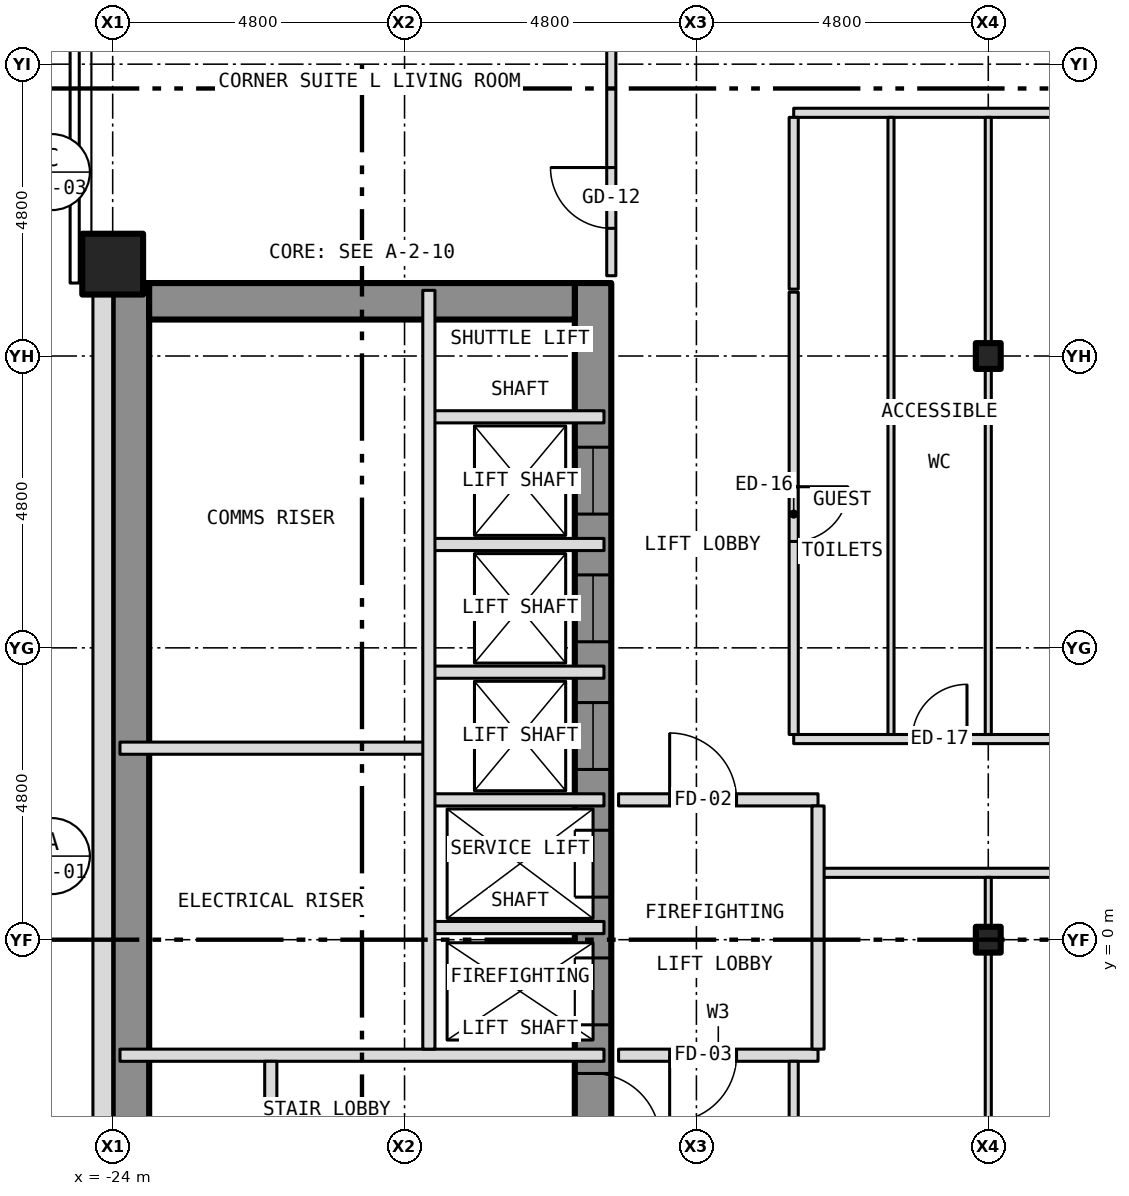
"""IFC4 building model, lengths in metres.
Left out: names, types, materials, properties, quantities, classifications, styles, units other than length and angle.
Written with IfcOpenShell. Run it as: python <this file> out.ifc"""

import sys

from ifc_helpers import new_model, si_unit, direction, frame, frame_2d, origin, origin_2d, place, context, subcontext, project, spatial, rectangle, hollow_rectangle, i_section, extrude, element, fill, save


model = new_model("IFC4")
c1 = context("Model", 3, precision=1e-05, world=origin(), true_north=direction((0.0, 1.0)))
c2 = subcontext(c1, "Body", "Model", "MODEL_VIEW")
j1 = project(units=[si_unit("LENGTHUNIT", "METRE"), si_unit("PLANEANGLEUNIT", "RADIAN")], contexts=[c1])
p1 = place(None, origin())
s1 = spatial("IfcSite", under=j1, at=p1, CompositionType="ELEMENT")
p2 = place(p1, origin())
s2 = spatial("IfcBuilding", under=s1, at=p2, CompositionType="ELEMENT")
p3 = place(p2, frame((0.0, 0.0, 39.0)))
s3 = spatial("IfcBuildingStorey", under=s2, at=p3, CompositionType="ELEMENT", Elevation=39.0)
p4 = place(p3, frame((-24.0, 11.111, -0.15), z_axis=(0.0, 0.0, 1.0), x_axis=(1.0, 0.0, 0.0)))
e1 = element("IfcColumn", 1, at=p4, inside=s3, PredefinedType="COLUMN", context=c2, shape_type="SweptSolid", body=[
    extrude(hollow_rectangle(XDim=1.0, YDim=1.0, WallThickness=0.06, at=origin_2d()), origin(), (0.0, 0.0, 1.0), 3.5),
])
for number, where, z_axis, x_axis in (
    (2, (-9.6, 0.0, -0.15), (0.0, 0.0, 1.0), (1.0, 0.0, 0.0)),
    (3, (-9.6, 9.6, -0.15), (0.0, 0.0, 1.0), (1.0, 0.0, 0.0)),
):
    element("IfcColumn", number, at=place(p3, frame(where, z_axis=z_axis, x_axis=x_axis)), inside=s3, PredefinedType="COLUMN", context=c2, shape_type="SweptSolid", body=[
        extrude(i_section(OverallWidth=0.409, OverallDepth=0.424, WebThickness=0.033, FlangeThickness=0.052, at=origin_2d()), origin(), (0.0, 0.0, 1.0), 3.5),
    ])
p5 = place(p3, frame((-16.1, -10.8, 0.0), z_axis=(0.0, 0.0, 1.0), x_axis=(0.0, 1.0, 0.0)))
e4 = element("IfcWall", 4, at=p5, inside=s3, PredefinedType="SHEAR", context=c2, shape_type="SweptSolid", body=[
    extrude(rectangle(XDim=21.6, YDim=0.6, at=frame_2d((10.8, 0.0))), origin(), (0.0, 0.0, 1.0), 3.25),
])
p6 = place(p5, frame((9.4, 0.0, 0.0)))
e5 = element("IfcOpeningElement", 5, at=p6, cuts=e4, PredefinedType="OPENING", context=c2, shape_type="SweptSolid", body=[
    extrude(rectangle(XDim=1.1, YDim=2.1, at=frame_2d((0.55, 1.05))), frame((0.0, 0.312, 0.0), z_axis=(0.0, -1.0, 0.0), x_axis=(1.0, 0.0, 0.0)), (0.0, 0.0, 1.0), 0.624),
])
p7 = place(p5, frame((11.5, 0.0, 0.0)))
e6 = element("IfcOpeningElement", 6, at=p7, cuts=e4, PredefinedType="OPENING", context=c2, shape_type="SweptSolid", body=[
    extrude(rectangle(XDim=1.1, YDim=2.1, at=frame_2d((0.55, 1.05))), frame((0.0, 0.312, 0.0), z_axis=(0.0, -1.0, 0.0), x_axis=(1.0, 0.0, 0.0)), (0.0, 0.0, 1.0), 0.624),
])
p8 = place(p5, frame((13.6, 0.0, 0.0)))
e7 = element("IfcOpeningElement", 7, at=p8, cuts=e4, PredefinedType="OPENING", context=c2, shape_type="SweptSolid", body=[
    extrude(rectangle(XDim=1.1, YDim=2.1, at=frame_2d((0.55, 1.05))), frame((0.0, 0.312, 0.0), z_axis=(0.0, -1.0, 0.0), x_axis=(1.0, 0.0, 0.0)), (0.0, 0.0, 1.0), 0.624),
])
p9 = place(p5, frame((15.7, 0.0, 0.0)))
e8 = element("IfcOpeningElement", 8, at=p9, cuts=e4, PredefinedType="OPENING", context=c2, shape_type="SweptSolid", body=[
    extrude(rectangle(XDim=1.1, YDim=2.1, at=frame_2d((0.55, 1.05))), frame((0.0, 0.312, 0.0), z_axis=(0.0, -1.0, 0.0), x_axis=(1.0, 0.0, 0.0)), (0.0, 0.0, 1.0), 0.624),
])
p10 = place(p5, frame((17.8, 0.0, 0.0)))
e9 = element("IfcOpeningElement", 9, at=p10, cuts=e4, PredefinedType="OPENING", context=c2, shape_type="SweptSolid", body=[
    extrude(rectangle(XDim=1.1, YDim=2.1, at=frame_2d((0.55, 1.05))), frame((0.0, 0.312, 0.0), z_axis=(0.0, -1.0, 0.0), x_axis=(1.0, 0.0, 0.0)), (0.0, 0.0, 1.0), 0.624),
])
p11 = place(p5, frame((0.758, 0.0, 0.0)))
e10 = element("IfcOpeningElement", 10, at=p11, cuts=e4, PredefinedType="OPENING", context=c2, shape_type="SweptSolid", body=[
    extrude(rectangle(XDim=1.1, YDim=2.1, at=frame_2d((0.55, 1.05))), frame((0.0, 0.312, 0.0), z_axis=(0.0, -1.0, 0.0), x_axis=(1.0, 0.0, 0.0)), (0.0, 0.0, 1.0), 0.624),
])
p12 = place(p5, frame((7.5, 0.0, 0.0)))
e11 = element("IfcOpeningElement", 11, at=p12, cuts=e4, PredefinedType="OPENING", context=c2, shape_type="SweptSolid", body=[
    extrude(rectangle(XDim=1.1, YDim=2.1, at=frame_2d((0.55, 1.05))), frame((0.0, 0.312, 0.0), z_axis=(0.0, -1.0, 0.0), x_axis=(1.0, 0.0, 0.0)), (0.0, 0.0, 1.0), 0.624),
])
p13 = place(p3, frame((-23.7, -10.8, 0.0), z_axis=(0.0, 0.0, 1.0), x_axis=(0.0, 1.0, 0.0)))
e12 = element("IfcWall", 12, at=p13, inside=s3, PredefinedType="SHEAR", context=c2, shape_type="SweptSolid", body=[
    extrude(rectangle(XDim=21.6, YDim=0.6, at=frame_2d((10.8, 0.0))), origin(), (0.0, 0.0, 1.0), 3.25),
])
p14 = place(p3, frame((-23.4, 10.5, 0.0), z_axis=(0.0, 0.0, 1.0), x_axis=(1.0, 0.0, 0.0)))
e13 = element("IfcWall", 13, at=p14, inside=s3, PredefinedType="SHEAR", context=c2, shape_type="SweptSolid", body=[
    extrude(rectangle(XDim=7.0, YDim=0.6, at=frame_2d((3.5, 0.0))), origin(), (0.0, 0.0, 1.0), 3.25),
])
p15 = place(p3, frame((-24.163, 10.8, 0.0), z_axis=(0.0, 0.0, 1.0), x_axis=(0.0, -1.0, 0.0)))
e14 = element("IfcWall", 14, at=p15, inside=s3, PredefinedType="SOLIDWALL", context=c2, shape_type="SweptSolid", body=[
    extrude(rectangle(XDim=21.6, YDim=0.325, at=frame_2d((10.8, 0.0))), origin(), (0.0, 0.0, 1.0), 3.5),
])
p16 = place(p15, frame((18.05, 0.0, 1.0)))
e15 = element("IfcOpeningElement", 15, at=p16, cuts=e14, PredefinedType="OPENING", context=c2, shape_type="SweptSolid", body=[
    extrude(rectangle(XDim=0.6, YDim=1.5, at=frame_2d((0.3, 0.75))), frame((0.0, 0.175, 0.0), z_axis=(0.0, -1.0, 0.0), x_axis=(1.0, 0.0, 0.0)), (0.0, 0.0, 1.0), 0.349),
])
p17 = place(p3, frame((-23.88, -1.9, 0.0), z_axis=(0.0, 0.0, 1.0), x_axis=(1.0, 0.0, 0.0)))
e16 = element("IfcWall", 16, at=p17, inside=s3, PredefinedType="PARTITIONING", context=c2, shape_type="SweptSolid", body=[
    extrude(rectangle(XDim=7.96, YDim=0.2, at=frame_2d((3.98, 0.0))), origin(), (0.0, 0.0, 1.0), 3.25),
])
p18 = place(p3, frame((-15.68, -1.9, 0.0), z_axis=(0.0, 0.0, 1.0), x_axis=(1.0, 0.0, 0.0)))
e17 = element("IfcWall", 17, at=p18, inside=s3, PredefinedType="PARTITIONING", context=c2, shape_type="SweptSolid", body=[
    extrude(rectangle(XDim=3.28, YDim=0.2, at=frame_2d((1.64, 0.0))), origin(), (0.0, 0.0, 1.0), 3.35),
])
p19 = place(p18, frame((0.84, 0.0, 0.0)))
e18 = element("IfcOpeningElement", 18, at=p19, cuts=e17, PredefinedType="OPENING", context=c2, shape_type="SweptSolid", body=[
    extrude(rectangle(XDim=1.1, YDim=2.1, at=frame_2d((0.55, 1.05))), frame((0.0, 0.112, 0.0), z_axis=(0.0, -1.0, 0.0), x_axis=(1.0, 0.0, 0.0)), (0.0, 0.0, 1.0), 0.224),
])
p20 = place(p3, frame((-18.8, 0.2, 0.0), z_axis=(0.0, 0.0, 1.0), x_axis=(1.0, 0.0, 0.0)))
e19 = element("IfcWall", 19, at=p20, inside=s3, PredefinedType="PARTITIONING", context=c2, shape_type="SweptSolid", body=[
    extrude(rectangle(XDim=2.88, YDim=0.2, at=frame_2d((1.44, 0.0))), origin(), (0.0, 0.0, 1.0), 3.25),
])
p21 = place(p3, frame((-12.4, 1.1, 0.0), z_axis=(0.0, 0.0, 1.0), x_axis=(1.0, 0.0, 0.0)))
e20 = element("IfcWall", 20, at=p21, inside=s3, PredefinedType="PARTITIONING", context=c2, shape_type="SweptSolid", body=[
    extrude(rectangle(XDim=24.8, YDim=0.15, at=frame_2d((12.4, 0.0))), origin(), (0.0, 0.0, 1.0), 3.35),
])
p22 = place(p3, frame((-18.8, 2.3, 0.0), z_axis=(0.0, 0.0, 1.0), x_axis=(1.0, 0.0, 0.0)))
e21 = element("IfcWall", 21, at=p22, inside=s3, PredefinedType="PARTITIONING", context=c2, shape_type="SweptSolid", body=[
    extrude(rectangle(XDim=2.88, YDim=0.2, at=frame_2d((1.44, 0.0))), origin(), (0.0, 0.0, 1.0), 3.25),
])
p23 = place(p3, frame((-15.68, 2.3, 0.0), z_axis=(0.0, 0.0, 1.0), x_axis=(1.0, 0.0, 0.0)))
e22 = element("IfcWall", 22, at=p23, inside=s3, PredefinedType="PARTITIONING", context=c2, shape_type="SweptSolid", body=[
    extrude(rectangle(XDim=3.28, YDim=0.2, at=frame_2d((1.64, 0.0))), origin(), (0.0, 0.0, 1.0), 3.35),
])
p24 = place(p23, frame((0.84, 0.0, 0.0)))
e23 = element("IfcOpeningElement", 23, at=p24, cuts=e22, PredefinedType="OPENING", context=c2, shape_type="SweptSolid", body=[
    extrude(rectangle(XDim=1.1, YDim=2.1, at=frame_2d((0.55, 1.05))), frame((0.0, 0.112, 0.0), z_axis=(0.0, -1.0, 0.0), x_axis=(1.0, 0.0, 0.0)), (0.0, 0.0, 1.0), 0.224),
])
p25 = place(p3, frame((-23.88, 3.15, 0.0), z_axis=(0.0, 0.0, 1.0), x_axis=(1.0, 0.0, 0.0)))
e24 = element("IfcWall", 24, at=p25, inside=s3, PredefinedType="PARTITIONING", context=c2, shape_type="SweptSolid", body=[
    extrude(rectangle(XDim=5.08, YDim=0.2, at=frame_2d((2.54, 0.0))), origin(), (0.0, 0.0, 1.0), 3.25),
])
p26 = place(p3, frame((-12.8, 3.3, 0.0), z_axis=(0.0, 0.0, 1.0), x_axis=(1.0, 0.0, 0.0)))
e25 = element("IfcWall", 25, at=p26, inside=s3, PredefinedType="PARTITIONING", context=c2, shape_type="SweptSolid", body=[
    extrude(rectangle(XDim=25.6, YDim=0.15, at=frame_2d((12.8, 0.0))), origin(), (0.0, 0.0, 1.0), 3.35),
])
p27 = place(p26, frame((1.95, 0.0, 0.0)))
e26 = element("IfcOpeningElement", 26, at=p27, cuts=e25, PredefinedType="OPENING", context=c2, shape_type="SweptSolid", body=[
    extrude(rectangle(XDim=0.9, YDim=2.1, at=frame_2d((0.45, 1.05))), frame((0.0, 0.087, 0.0), z_axis=(0.0, -1.0, 0.0), x_axis=(1.0, 0.0, 0.0)), (0.0, 0.0, 1.0), 0.174),
])
for number, where, z_axis, x_axis in (
    (27, (-18.8, 4.4, 0.0), (0.0, 0.0, 1.0), (1.0, 0.0, 0.0)),
    (28, (-18.8, 6.5, 0.0), (0.0, 0.0, 1.0), (1.0, 0.0, 0.0)),
    (29, (-18.8, 8.6, 0.0), (0.0, 0.0, 1.0), (1.0, 0.0, 0.0)),
):
    element("IfcWall", number, at=place(p3, frame(where, z_axis=z_axis, x_axis=x_axis)), inside=s3, PredefinedType="PARTITIONING", context=c2, shape_type="SweptSolid", body=[
        extrude(rectangle(XDim=2.88, YDim=0.2, at=frame_2d((1.44, 0.0))), origin(), (0.0, 0.0, 1.0), 3.25),
    ])
p28 = place(p3, frame((-12.8, 13.6, 0.0), z_axis=(0.0, 0.0, 1.0), x_axis=(1.0, 0.0, 0.0)))
e30 = element("IfcWall", 30, at=p28, inside=s3, PredefinedType="PARTITIONING", context=c2, shape_type="SweptSolid", body=[
    extrude(rectangle(XDim=25.6, YDim=0.15, at=frame_2d((12.8, 0.0))), origin(), (0.0, 0.0, 1.0), 3.35),
])
p29 = place(p28, frame((12.35, 0.0, 0.0)))
e31 = element("IfcOpeningElement", 31, at=p29, cuts=e30, PredefinedType="OPENING", context=c2, shape_type="SweptSolid", body=[
    extrude(rectangle(XDim=0.9, YDim=2.1, at=frame_2d((0.45, 1.05))), frame((0.0, 0.087, 0.0), z_axis=(0.0, -1.0, 0.0), x_axis=(1.0, 0.0, 0.0)), (0.0, 0.0, 1.0), 0.174),
])
p30 = place(p3, frame((-21.4, -10.68, 0.0), z_axis=(0.0, 0.0, 1.0), x_axis=(0.0, 1.0, 0.0)))
e32 = element("IfcWall", 32, at=p30, inside=s3, PredefinedType="PARTITIONING", context=c2, shape_type="SweptSolid", body=[
    extrude(rectangle(XDim=8.68, YDim=0.2, at=frame_2d((4.34, 0.0))), origin(), (0.0, 0.0, 1.0), 3.25),
])
p31 = place(p30, frame((0.899, 0.0, 0.0)))
e33 = element("IfcOpeningElement", 33, at=p31, cuts=e32, PredefinedType="OPENING", context=c2, shape_type="SweptSolid", body=[
    extrude(rectangle(XDim=0.9, YDim=2.1, at=frame_2d((0.45, 1.05))), frame((0.0, 0.112, 0.0), z_axis=(0.0, -1.0, 0.0), x_axis=(1.0, 0.0, 0.0)), (0.0, 0.0, 1.0), 0.224),
])
p32 = place(p30, frame((5.349, 0.0, 0.0)))
e34 = element("IfcOpeningElement", 34, at=p32, cuts=e32, PredefinedType="OPENING", context=c2, shape_type="SweptSolid", body=[
    extrude(rectangle(XDim=0.9, YDim=2.1, at=frame_2d((0.45, 1.05))), frame((0.0, 0.112, 0.0), z_axis=(0.0, -1.0, 0.0), x_axis=(1.0, 0.0, 0.0)), (0.0, 0.0, 1.0), 0.224),
])
p33 = place(p3, frame((-18.8, -1.8, 0.0), z_axis=(0.0, 0.0, 1.0), x_axis=(0.0, 1.0, 0.0)))
e35 = element("IfcWall", 35, at=p33, inside=s3, PredefinedType="PARTITIONING", context=c2, shape_type="SweptSolid", body=[
    extrude(rectangle(XDim=12.48, YDim=0.2, at=frame_2d((6.24, 0.0))), origin(), (0.0, 0.0, 1.0), 3.25),
])
p34 = place(p3, frame((-15.8, 10.92, 0.0), z_axis=(0.0, 0.0, 1.0), x_axis=(0.0, 1.0, 0.0)))
e36 = element("IfcWall", 36, at=p34, inside=s3, PredefinedType="PARTITIONING", context=c2, shape_type="SweptSolid", body=[
    extrude(rectangle(XDim=4.805, YDim=0.15, at=frame_2d((2.403, 0.0))), origin(), (0.0, 0.0, 1.0), 3.35),
])
p35 = place(p34, frame((0.78, 0.0, 0.0)))
e37 = element("IfcOpeningElement", 37, at=p35, cuts=e36, PredefinedType="OPENING", context=c2, shape_type="SweptSolid", body=[
    extrude(rectangle(XDim=1.0, YDim=2.1, at=frame_2d((0.5, 1.05))), frame((0.0, 0.087, 0.0), z_axis=(0.0, -1.0, 0.0), x_axis=(1.0, 0.0, 0.0)), (0.0, 0.0, 1.0), 0.174),
])
p36 = place(p3, frame((-12.8, -13.525, 0.0), z_axis=(0.0, 0.0, 1.0), x_axis=(0.0, 1.0, 0.0)))
e38 = element("IfcWall", 38, at=p36, inside=s3, PredefinedType="PARTITIONING", context=c2, shape_type="SweptSolid", body=[
    extrude(rectangle(XDim=11.525, YDim=0.15, at=frame_2d((5.762, 0.0))), origin(), (0.0, 0.0, 1.0), 3.35),
])
p37 = place(p36, frame((6.725, 0.0, 0.0)))
e39 = element("IfcOpeningElement", 39, at=p37, cuts=e38, PredefinedType="OPENING", context=c2, shape_type="SweptSolid", body=[
    extrude(rectangle(XDim=0.9, YDim=2.1, at=frame_2d((0.45, 1.05))), frame((0.0, 0.087, 0.0), z_axis=(0.0, -1.0, 0.0), x_axis=(1.0, 0.0, 0.0)), (0.0, 0.0, 1.0), 0.174),
])
p38 = place(p3, frame((-12.8, 3.375, 0.0), z_axis=(0.0, 0.0, 1.0), x_axis=(0.0, 1.0, 0.0)))
e40 = element("IfcWall", 40, at=p38, inside=s3, PredefinedType="PARTITIONING", context=c2, shape_type="SweptSolid", body=[
    extrude(rectangle(XDim=7.275, YDim=0.15, at=frame_2d((3.637, 0.0))), origin(), (0.0, 0.0, 1.0), 3.35),
])
p39 = place(p38, frame((3.175, 0.0, 0.0)))
e41 = element("IfcOpeningElement", 41, at=p39, cuts=e40, PredefinedType="OPENING", context=c2, shape_type="SweptSolid", body=[
    extrude(rectangle(XDim=0.9, YDim=2.1, at=frame_2d((0.45, 1.05))), frame((0.0, 0.087, 0.0), z_axis=(0.0, -1.0, 0.0), x_axis=(1.0, 0.0, 0.0)), (0.0, 0.0, 1.0), 0.174),
])
p40 = place(p3, frame((-12.8, 10.7, 0.0), z_axis=(0.0, 0.0, 1.0), x_axis=(0.0, 1.0, 0.0)))
e42 = element("IfcWall", 42, at=p40, inside=s3, PredefinedType="PARTITIONING", context=c2, shape_type="SweptSolid", body=[
    extrude(rectangle(XDim=2.825, YDim=0.15, at=frame_2d((1.413, 0.0))), origin(), (0.0, 0.0, 1.0), 3.35),
])
p41 = place(p3, frame((-12.4, -1.8, 0.0), z_axis=(0.0, 0.0, 1.0), x_axis=(0.0, 1.0, 0.0)))
e43 = element("IfcWall", 43, at=p41, inside=s3, PredefinedType="PARTITIONING", context=c2, shape_type="SweptSolid", body=[
    extrude(rectangle(XDim=4.0, YDim=0.2, at=frame_2d((2.0, 0.0))), origin(), (0.0, 0.0, 1.0), 3.35),
])
p42 = place(p3, frame((-11.2, 3.375, 0.0), z_axis=(0.0, 0.0, 1.0), x_axis=(0.0, 1.0, 0.0)))
e44 = element("IfcWall", 44, at=p42, inside=s3, PredefinedType="PARTITIONING", context=c2, shape_type="SweptSolid", body=[
    extrude(rectangle(XDim=10.15, YDim=0.1, at=frame_2d((5.075, 0.0))), origin(), (0.0, 0.0, 1.0), 3.35),
])
p43 = place(p3, frame((-9.6, -9.396, 0.0), z_axis=(0.0, 0.0, 1.0), x_axis=(0.0, 1.0, 0.0)))
e45 = element("IfcWall", 45, at=p43, inside=s3, PredefinedType="PARTITIONING", context=c2, shape_type="SweptSolid", body=[
    extrude(rectangle(XDim=9.192, YDim=0.1, at=frame_2d((4.596, 0.0))), origin(), (0.0, 0.0, 1.0), 2.728),
])
p44 = place(p3, frame((-9.6, -0.204, 0.0), z_axis=(0.0, 0.0, 1.0), x_axis=(0.0, 1.0, 0.0)))
e46 = element("IfcWall", 46, at=p44, inside=s3, PredefinedType="PARTITIONING", context=c2, shape_type="SweptSolid", body=[
    extrude(rectangle(XDim=0.408, YDim=0.1, at=frame_2d((0.204, 0.0))), origin(), (0.0, 0.0, 1.0), 3.35),
])
p45 = place(p3, frame((-9.6, 0.204, 0.0), z_axis=(0.0, 0.0, 1.0), x_axis=(0.0, 1.0, 0.0)))
e47 = element("IfcWall", 47, at=p45, inside=s3, PredefinedType="PARTITIONING", context=c2, shape_type="SweptSolid", body=[
    extrude(rectangle(XDim=0.821, YDim=0.1, at=frame_2d((0.41, 0.0))), origin(), (0.0, 0.0, 1.0), 2.728),
])
p46 = place(p3, frame((-9.6, 3.375, 0.0), z_axis=(0.0, 0.0, 1.0), x_axis=(0.0, 1.0, 0.0)))
e48 = element("IfcWall", 48, at=p46, inside=s3, PredefinedType="PARTITIONING", context=c2, shape_type="SweptSolid", body=[
    extrude(rectangle(XDim=6.021, YDim=0.1, at=frame_2d((3.01, 0.0))), origin(), (0.0, 0.0, 1.0), 2.728),
])
p47 = place(p3, frame((-9.6, 9.396, 0.0), z_axis=(0.0, 0.0, 1.0), x_axis=(0.0, 1.0, 0.0)))
e49 = element("IfcWall", 49, at=p47, inside=s3, PredefinedType="PARTITIONING", context=c2, shape_type="SweptSolid", body=[
    extrude(rectangle(XDim=0.408, YDim=0.1, at=frame_2d((0.204, 0.0))), origin(), (0.0, 0.0, 1.0), 3.35),
])
p48 = place(p3, frame((-9.6, 9.804, 0.0), z_axis=(0.0, 0.0, 1.0), x_axis=(0.0, 1.0, 0.0)))
e50 = element("IfcWall", 50, at=p48, inside=s3, PredefinedType="PARTITIONING", context=c2, shape_type="SweptSolid", body=[
    extrude(rectangle(XDim=3.721, YDim=0.1, at=frame_2d((1.86, 0.0))), origin(), (0.0, 0.0, 1.0), 2.728),
])
p49 = place(p6, origin())
e51 = element("IfcDoor", 51, at=p49, inside=s3, OperationType="SLIDING_TO_LEFT", PredefinedType="DOOR", context=c2, shape_type="SweptSolid", body=[
    extrude(rectangle(XDim=1.1, YDim=2.1, at=frame_2d((0.55, 1.05))), frame((0.0, 0.025, 0.0), z_axis=(0.0, -1.0, 0.0), x_axis=(1.0, 0.0, 0.0)), (0.0, 0.0, 1.0), 0.05),
])
fill(e5, e51)
p50 = place(p7, origin())
e52 = element("IfcDoor", 52, at=p50, inside=s3, OperationType="SLIDING_TO_LEFT", PredefinedType="DOOR", context=c2, shape_type="SweptSolid", body=[
    extrude(rectangle(XDim=1.1, YDim=2.1, at=frame_2d((0.55, 1.05))), frame((0.0, 0.025, 0.0), z_axis=(0.0, -1.0, 0.0), x_axis=(1.0, 0.0, 0.0)), (0.0, 0.0, 1.0), 0.05),
])
fill(e6, e52)
p51 = place(p8, origin())
e53 = element("IfcDoor", 53, at=p51, inside=s3, OperationType="SLIDING_TO_LEFT", PredefinedType="DOOR", context=c2, shape_type="SweptSolid", body=[
    extrude(rectangle(XDim=1.1, YDim=2.1, at=frame_2d((0.55, 1.05))), frame((0.0, 0.025, 0.0), z_axis=(0.0, -1.0, 0.0), x_axis=(1.0, 0.0, 0.0)), (0.0, 0.0, 1.0), 0.05),
])
fill(e7, e53)
p52 = place(p9, origin())
e54 = element("IfcDoor", 54, at=p52, inside=s3, OperationType="SLIDING_TO_LEFT", PredefinedType="DOOR", context=c2, shape_type="SweptSolid", body=[
    extrude(rectangle(XDim=1.1, YDim=2.1, at=frame_2d((0.55, 1.05))), frame((0.0, 0.025, 0.0), z_axis=(0.0, -1.0, 0.0), x_axis=(1.0, 0.0, 0.0)), (0.0, 0.0, 1.0), 0.05),
])
fill(e8, e54)
p53 = place(p10, origin())
e55 = element("IfcDoor", 55, at=p53, inside=s3, OperationType="SLIDING_TO_LEFT", PredefinedType="DOOR", context=c2, shape_type="SweptSolid", body=[
    extrude(rectangle(XDim=1.1, YDim=2.1, at=frame_2d((0.55, 1.05))), frame((0.0, 0.025, 0.0), z_axis=(0.0, -1.0, 0.0), x_axis=(1.0, 0.0, 0.0)), (0.0, 0.0, 1.0), 0.05),
])
fill(e9, e55)
p54 = place(p12, origin())
e56 = element("IfcDoor", 56, at=p54, inside=s3, OperationType="SINGLE_SWING_LEFT", PredefinedType="DOOR", context=c2, shape_type="SweptSolid", body=[
    extrude(rectangle(XDim=1.1, YDim=2.1, at=frame_2d((0.55, 1.05))), frame((0.0, 0.025, 0.0), z_axis=(0.0, -1.0, 0.0), x_axis=(1.0, 0.0, 0.0)), (0.0, 0.0, 1.0), 0.05),
])
fill(e11, e56)
p55 = place(p24, origin())
e57 = element("IfcDoor", 57, at=p55, inside=s3, OperationType="SINGLE_SWING_LEFT", PredefinedType="DOOR", context=c2, shape_type="SweptSolid", body=[
    extrude(rectangle(XDim=1.1, YDim=2.1, at=frame_2d((0.55, 1.05))), frame((0.0, 0.025, 0.0), z_axis=(0.0, -1.0, 0.0), x_axis=(1.0, 0.0, 0.0)), (0.0, 0.0, 1.0), 0.05),
])
fill(e23, e57)
p56 = place(p19, origin())
e58 = element("IfcDoor", 58, at=p56, inside=s3, OperationType="SINGLE_SWING_LEFT", PredefinedType="DOOR", context=c2, shape_type="SweptSolid", body=[
    extrude(rectangle(XDim=1.1, YDim=2.1, at=frame_2d((0.55, 1.05))), frame((0.0, 0.025, 0.0), z_axis=(0.0, -1.0, 0.0), x_axis=(1.0, 0.0, 0.0)), (0.0, 0.0, 1.0), 0.05),
])
fill(e18, e58)
p57 = place(p35, origin())
e59 = element("IfcDoor", 59, at=p57, inside=s3, OperationType="SINGLE_SWING_RIGHT", PredefinedType="DOOR", context=c2, shape_type="SweptSolid", body=[
    extrude(rectangle(XDim=1.0, YDim=2.1, at=frame_2d((0.5, 1.05))), frame((0.0, 0.025, 0.0), z_axis=(0.0, -1.0, 0.0), x_axis=(1.0, 0.0, 0.0)), (0.0, 0.0, 1.0), 0.05),
])
fill(e37, e59)
p58 = place(p39, origin())
e60 = element("IfcDoor", 60, at=p58, inside=s3, OperationType="SINGLE_SWING_RIGHT", PredefinedType="DOOR", context=c2, shape_type="SweptSolid", body=[
    extrude(rectangle(XDim=0.9, YDim=2.1, at=frame_2d((0.45, 1.05))), frame((0.0, 0.025, 0.0), z_axis=(0.0, -1.0, 0.0), x_axis=(1.0, 0.0, 0.0)), (0.0, 0.0, 1.0), 0.05),
])
fill(e41, e60)
p59 = place(p27, origin())
e61 = element("IfcDoor", 61, at=p59, inside=s3, OperationType="SINGLE_SWING_RIGHT", PredefinedType="DOOR", context=c2, shape_type="SweptSolid", body=[
    extrude(rectangle(XDim=0.9, YDim=2.1, at=frame_2d((0.45, 1.05))), frame((0.0, 0.025, 0.0), z_axis=(0.0, -1.0, 0.0), x_axis=(1.0, 0.0, 0.0)), (0.0, 0.0, 1.0), 0.05),
])
fill(e26, e61)
save(model, sys.argv[1])
